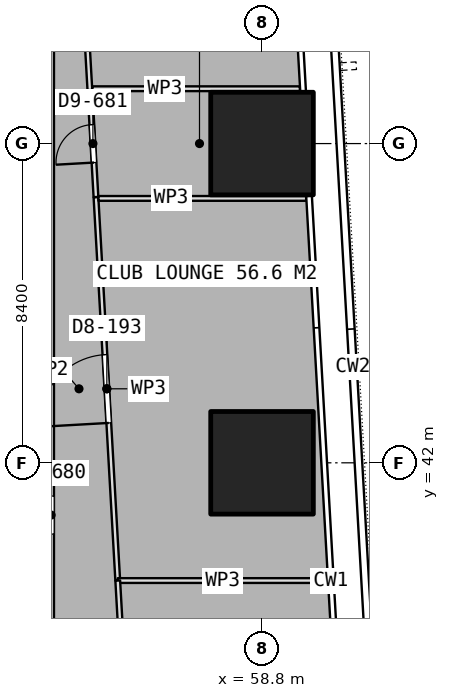
"""IFC4 building model, lengths in metres.
Left out: names, types, materials, properties, quantities, classifications, styles, units other than length and angle.
Written with IfcOpenShell. Run it as: python <this file> out.ifc"""

import sys

from ifc_helpers import new_model, si_unit, direction, frame, frame_2d, origin, origin_2d, place, context, subcontext, project, spatial, rectangle, extrude, element, fill, save


model = new_model("IFC4")
c1 = context("Model", 3, precision=1e-05, world=origin(), true_north=direction((0.0, 1.0)))
c2 = subcontext(c1, "Body", "Model", "MODEL_VIEW")
j1 = project(units=[si_unit("LENGTHUNIT", "METRE"), si_unit("PLANEANGLEUNIT", "RADIAN")], contexts=[c1])
p1 = place(None, origin())
s1 = spatial("IfcSite", under=j1, at=p1, CompositionType="ELEMENT")
p2 = place(p1, origin())
s2 = spatial("IfcBuilding", under=s1, at=p2, CompositionType="ELEMENT")
p3 = place(p2, frame((0.0, 0.0, 172.7)))
s3 = spatial("IfcBuildingStorey", under=s2, at=p3, CompositionType="ELEMENT", Elevation=172.7)
for number, where, z_axis, x_axis in (
    (1, (58.8, 42.0, 0.0), (0.0, 0.0, 1.0), (1.0, 0.0, 0.0)),
    (2, (58.8, 50.4, 0.0), (0.0, 0.0, 1.0), (1.0, 0.0, 0.0)),
):
    element("IfcColumn", number, at=place(p3, frame(where, z_axis=z_axis, x_axis=x_axis)), inside=s3, PredefinedType="COLUMN", context=c2, shape_type="SweptSolid", body=[
        extrude(rectangle(XDim=2.7, YDim=2.7, at=origin_2d()), origin(), (0.0, 0.0, 1.0), 3.75),
    ])
p4 = place(p3, frame((55.003, 38.902, 0.0), z_axis=(0.0, 0.0, 1.0), x_axis=(1.0, 0.0, 0.0)))
e3 = element("IfcWall", 3, at=p4, inside=s3, PredefinedType="PARTITIONING", context=c2, shape_type="SweptSolid", body=[
    extrude(rectangle(XDim=5.528, YDim=0.125, at=frame_2d((2.764, 0.0))), origin(), (0.0, 0.0, 1.0), 3.5),
])
p5 = place(p3, frame((55.565, 28.991, 0.0), z_axis=(0.0, 0.0, 1.0), x_axis=(-0.056614146669, 0.998396133004, 0.0)))
e4 = element("IfcWall", 4, at=p5, inside=s3, PredefinedType="PARTITIONING", context=c2, shape_type="SweptSolid", body=[
    extrude(rectangle(XDim=9.927, YDim=0.125, at=frame_2d((4.963, 0.0))), origin(), (0.0, 0.0, 1.0), 3.5),
])
p6 = place(p5, frame((4.063, 0.0, 0.0)))
e5 = element("IfcOpeningElement", 5, at=p6, cuts=e4, PredefinedType="OPENING", context=c2, shape_type="SweptSolid", body=[
    extrude(rectangle(XDim=1.8, YDim=2.1, at=frame_2d((0.9, 1.05))), frame((0.0, 0.073, 0.0), z_axis=(0.0, -1.0, 0.0), x_axis=(1.0, 0.0, 0.0)), (0.0, 0.0, 1.0), 0.145),
])
p7 = place(p3, frame((55.003, 38.903, 0.0), z_axis=(0.0, 0.0, 1.0), x_axis=(-0.056703702353, 0.998391050711, 0.0)))
e6 = element("IfcWall", 6, at=p7, inside=s3, PredefinedType="PARTITIONING", context=c2, shape_type="SweptSolid", body=[
    extrude(rectangle(XDim=10.105, YDim=0.125, at=frame_2d((5.053, 0.0))), origin(), (0.0, 0.0, 1.0), 3.5),
])
p8 = place(p7, frame((4.153, 0.0, 0.0)))
e7 = element("IfcOpeningElement", 7, at=p8, cuts=e6, PredefinedType="OPENING", context=c2, shape_type="SweptSolid", body=[
    extrude(rectangle(XDim=1.8, YDim=2.1, at=frame_2d((0.9, 1.05))), frame((0.0, 0.073, 0.0), z_axis=(0.0, -1.0, 0.0), x_axis=(1.0, 0.0, 0.0)), (0.0, 0.0, 1.0), 0.145),
])
p9 = place(p3, frame((54.495, 48.957, 0.0), z_axis=(0.0, 0.0, 1.0), x_axis=(1.0, 0.0, 0.0)))
e8 = element("IfcWall", 8, at=p9, inside=s3, PredefinedType="PARTITIONING", context=c2, shape_type="SweptSolid", body=[
    extrude(rectangle(XDim=5.466, YDim=0.125, at=frame_2d((2.733, 0.0))), origin(), (0.0, 0.0, 1.0), 3.5),
])
p10 = place(p3, frame((54.43, 48.993, 0.0), z_axis=(0.0, 0.0, 1.0), x_axis=(-0.056736501623, 0.998389187333, 0.0)))
e9 = element("IfcWall", 9, at=p10, inside=s3, PredefinedType="PARTITIONING", context=c2, shape_type="SweptSolid", body=[
    extrude(rectangle(XDim=2.819, YDim=0.125, at=frame_2d((1.409, 0.0))), origin(), (0.0, 0.0, 1.0), 3.5),
])
p11 = place(p10, frame((0.909, 0.0, 0.0)))
e10 = element("IfcOpeningElement", 10, at=p11, cuts=e9, PredefinedType="OPENING", context=c2, shape_type="SweptSolid", body=[
    extrude(rectangle(XDim=1.0, YDim=2.1, at=frame_2d((0.5, 1.05))), frame((0.0, 0.073, 0.0), z_axis=(0.0, -1.0, 0.0), x_axis=(1.0, 0.0, 0.0)), (0.0, 0.0, 1.0), 0.145),
])
p12 = place(p3, frame((54.331, 51.843, 0.0), z_axis=(0.0, 0.0, 1.0), x_axis=(1.0, 0.0, 0.0)))
e11 = element("IfcWall", 11, at=p12, inside=s3, PredefinedType="PARTITIONING", context=c2, shape_type="SweptSolid", body=[
    extrude(rectangle(XDim=5.466, YDim=0.125, at=frame_2d((2.733, 0.0))), origin(), (0.0, 0.0, 1.0), 3.5),
])
p13 = place(p3, frame((54.27, 51.808, 0.0), z_axis=(0.0, 0.0, 1.0), x_axis=(-0.056507045715, 0.998402200411, 0.0)))
e12 = element("IfcWall", 12, at=p13, inside=s3, PredefinedType="PARTITIONING", context=c2, shape_type="SweptSolid", body=[
    extrude(rectangle(XDim=3.664, YDim=0.125, at=frame_2d((1.832, 0.0))), origin(), (0.0, 0.0, 1.0), 3.5),
])
p14 = place(p3, frame((53.25, 28.075, 0.0), z_axis=(0.0, 0.0, 1.0), x_axis=(0.0, 1.0, 0.0)))
e13 = element("IfcWall", 13, at=p14, inside=s3, PredefinedType="PARTITIONING", context=c2, shape_type="SweptSolid", body=[
    extrude(rectangle(XDim=25.175, YDim=0.15, at=frame_2d((12.587, 0.0))), origin(), (0.0, 0.0, 1.0), 3.5),
])
p15 = place(p14, frame((12.05, 0.0, 0.0)))
e14 = element("IfcOpeningElement", 14, at=p15, cuts=e13, PredefinedType="OPENING", context=c2, shape_type="SweptSolid", body=[
    extrude(rectangle(XDim=1.0, YDim=2.1, at=frame_2d((0.5, 1.05))), frame((0.0, 0.085, 0.0), z_axis=(0.0, -1.0, 0.0), x_axis=(1.0, 0.0, 0.0)), (0.0, 0.0, 1.0), 0.17),
])
p16 = place(p8, origin())
e15 = element("IfcDoor", 15, at=p16, inside=s3, OperationType="DOUBLE_DOOR_SINGLE_SWING", PredefinedType="DOOR", context=c2, shape_type="SweptSolid", body=[
    extrude(rectangle(XDim=1.8, YDim=2.1, at=frame_2d((0.9, 1.05))), frame((0.0, 0.025, 0.0), z_axis=(0.0, -1.0, 0.0), x_axis=(1.0, 0.0, 0.0)), (0.0, 0.0, 1.0), 0.05),
])
fill(e7, e15)
p17 = place(p11, origin())
e16 = element("IfcDoor", 16, at=p17, inside=s3, OperationType="SINGLE_SWING_LEFT", PredefinedType="DOOR", context=c2, shape_type="SweptSolid", body=[
    extrude(rectangle(XDim=1.0, YDim=2.1, at=frame_2d((0.5, 1.05))), frame((0.0, 0.025, 0.0), z_axis=(0.0, -1.0, 0.0), x_axis=(1.0, 0.0, 0.0)), (0.0, 0.0, 1.0), 0.05),
])
fill(e10, e16)
p18 = place(p15, origin())
e17 = element("IfcDoor", 17, at=p18, inside=s3, OperationType="SINGLE_SWING_LEFT", PredefinedType="DOOR", context=c2, shape_type="SweptSolid", body=[
    extrude(rectangle(XDim=1.0, YDim=2.1, at=frame_2d((0.5, 1.05))), frame((0.0, 0.025, 0.0), z_axis=(0.0, -1.0, 0.0), x_axis=(1.0, 0.0, 0.0)), (0.0, 0.0, 1.0), 0.05),
])
fill(e14, e17)
save(model, sys.argv[1])
